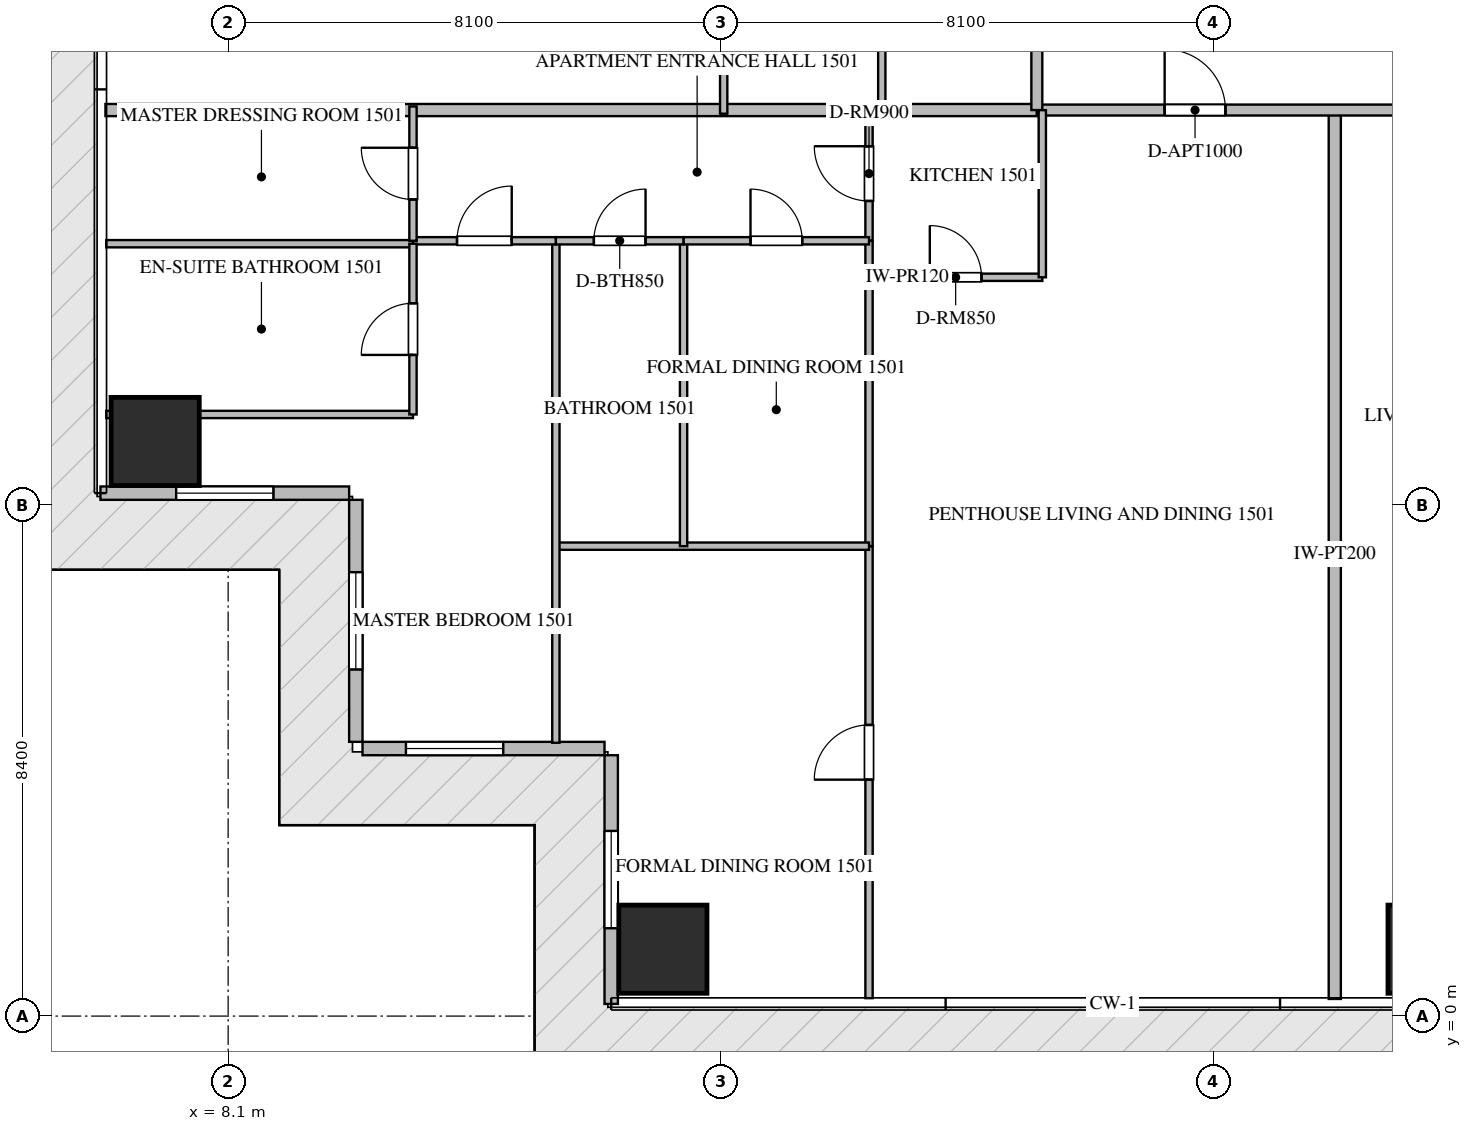
"""IFC4 building model, lengths in metres.
Left out: names, types, materials, properties, quantities, classifications, styles, units other than length and angle.
Written with IfcOpenShell. Run it as: python <this file> out.ifc"""

import sys

from ifc_helpers import new_model, si_unit, direction, frame, frame_2d, origin, origin_2d, place, context, subcontext, project, spatial, rectangle, extrude, source, transform, mapped, element, fill, save


model = new_model("IFC4")
c1 = context("Model", 3, precision=1e-05, world=origin(), true_north=direction((0.0, 1.0)))
c2 = subcontext(c1, "Body", "Model", "MODEL_VIEW")
j1 = project(units=[si_unit("LENGTHUNIT", "METRE"), si_unit("PLANEANGLEUNIT", "RADIAN")], contexts=[c1])
p1 = place(None, origin())
s1 = spatial("IfcSite", under=j1, at=p1, CompositionType="ELEMENT")
p2 = place(p1, origin())
s2 = spatial("IfcBuilding", under=s1, at=p2, CompositionType="ELEMENT")
p3 = place(p2, frame((0.0, 0.0, 64.2)))
s3 = spatial("IfcBuildingStorey", under=s2, at=p3, CompositionType="ELEMENT", Elevation=64.2)
m1 = source(origin(), c2, "Body", "SweptSolid", [
    extrude(rectangle(XDim=1.45, YDim=1.45, at=origin_2d()), origin(), (0.0, 0.0, 1.0), 3.75),
])
for number, where, z_axis, x_axis in (
    (1, (15.25, 1.1, -0.26), (0.0, 0.0, 1.0), (1.0, 0.0, 0.0)),
    (2, (27.9, 1.1, -0.26), (0.0, 0.0, 1.0), (1.0, 0.0, 0.0)),
    (3, (6.9, 9.45, -0.26), (0.0, 0.0, 1.0), (1.0, 0.0, 0.0)),
):
    element("IfcColumn", number, at=place(p3, frame(where, z_axis=z_axis, x_axis=x_axis)), inside=s3, PredefinedType="COLUMN", context=c2, shape_type="MappedRepresentation", body=[
        mapped(m1, transform((0.0, 0.0, 0.0), scale=1.0)),
    ])
p4 = place(p3, frame((6.0, 8.6, 0.0), z_axis=(0.0, 0.0, 1.0), x_axis=(1.0, 0.0, 0.0)))
e4 = element("IfcWall", 4, at=p4, inside=s3, PredefinedType="ELEMENTEDWALL", context=c2, shape_type="SweptSolid", body=[
    extrude(rectangle(XDim=4.09, YDim=0.22, at=frame_2d((2.045, 0.0))), origin(), (0.0, 0.0, 1.0), 3.475),
])
p5 = place(p4, frame((1.245, 0.0, 0.65)))
e5 = element("IfcOpeningElement", 5, at=p5, cuts=e4, PredefinedType="OPENING", context=c2, shape_type="SweptSolid", body=[
    extrude(rectangle(XDim=1.6, YDim=2.1, at=frame_2d((0.8, 1.05))), frame((0.0, 0.12, 0.0), z_axis=(0.0, -1.0, 0.0), x_axis=(1.0, 0.0, 0.0)), (0.0, 0.0, 1.0), 0.24),
])
p6 = place(p3, frame((10.2, 8.49, 0.0), z_axis=(0.0, 0.0, 1.0), x_axis=(0.0, -1.0, 0.0)))
e6 = element("IfcWall", 6, at=p6, inside=s3, PredefinedType="ELEMENTEDWALL", context=c2, shape_type="SweptSolid", body=[
    extrude(rectangle(XDim=3.98, YDim=0.22, at=frame_2d((1.99, 0.0))), origin(), (0.0, 0.0, 1.0), 3.475),
])
p7 = place(p6, frame((1.19, 0.0, 0.65)))
e7 = element("IfcOpeningElement", 7, at=p7, cuts=e6, PredefinedType="OPENING", context=c2, shape_type="SweptSolid", body=[
    extrude(rectangle(XDim=1.6, YDim=2.1, at=frame_2d((0.8, 1.05))), frame((0.0, 0.12, 0.0), z_axis=(0.0, -1.0, 0.0), x_axis=(1.0, 0.0, 0.0)), (0.0, 0.0, 1.0), 0.24),
])
p8 = place(p3, frame((10.31, 4.4, 0.0), z_axis=(0.0, 0.0, 1.0), x_axis=(1.0, 0.0, 0.0)))
e8 = element("IfcWall", 8, at=p8, inside=s3, PredefinedType="ELEMENTEDWALL", context=c2, shape_type="SweptSolid", body=[
    extrude(rectangle(XDim=3.98, YDim=0.22, at=frame_2d((1.99, 0.0))), origin(), (0.0, 0.0, 1.0), 3.475),
])
p9 = place(p8, frame((0.714, 0.0, 0.65)))
e9 = element("IfcOpeningElement", 9, at=p9, cuts=e8, PredefinedType="OPENING", context=c2, shape_type="SweptSolid", body=[
    extrude(rectangle(XDim=1.6, YDim=2.1, at=frame_2d((0.8, 1.05))), frame((0.0, 0.12, 0.0), z_axis=(0.0, -1.0, 0.0), x_axis=(1.0, 0.0, 0.0)), (0.0, 0.0, 1.0), 0.24),
])
p10 = place(p3, frame((14.4, 4.29, 0.0), z_axis=(0.0, 0.0, 1.0), x_axis=(0.0, -1.0, 0.0)))
e10 = element("IfcWall", 10, at=p10, inside=s3, PredefinedType="ELEMENTEDWALL", context=c2, shape_type="SweptSolid", body=[
    extrude(rectangle(XDim=4.09, YDim=0.22, at=frame_2d((2.045, 0.0))), origin(), (0.0, 0.0, 1.0), 3.475),
])
p11 = place(p10, frame((1.245, 0.0, 0.65)))
e11 = element("IfcOpeningElement", 11, at=p11, cuts=e10, PredefinedType="OPENING", context=c2, shape_type="SweptSolid", body=[
    extrude(rectangle(XDim=1.6, YDim=2.1, at=frame_2d((0.8, 1.05))), frame((0.0, 0.12, 0.0), z_axis=(0.0, -1.0, 0.0), x_axis=(1.0, 0.0, 0.0)), (0.0, 0.0, 1.0), 0.24),
])
p12 = place(p3, frame((26.3, 0.282, 0.0), z_axis=(0.0, 0.0, 1.0), x_axis=(0.0, 1.0, 0.0)))
e12 = element("IfcWall", 12, at=p12, inside=s3, PredefinedType="PARTITIONING", context=c2, shape_type="SweptSolid", body=[
    extrude(rectangle(XDim=14.618, YDim=0.2, at=frame_2d((7.309, 0.0))), origin(), (0.0, 0.0, 1.0), 3.49),
])
p13 = place(p3, frame((6.082, 14.9, 0.0), z_axis=(0.0, 0.0, 1.0), x_axis=(1.0, 0.0, 0.0)))
e13 = element("IfcWall", 13, at=p13, inside=s3, PredefinedType="PARTITIONING", context=c2, shape_type="SweptSolid", body=[
    extrude(rectangle(XDim=15.318, YDim=0.2, at=frame_2d((7.659, 0.0))), origin(), (0.0, 0.0, 1.0), 3.49),
])
p14 = place(p3, frame((21.402, 14.9, 0.0), z_axis=(0.0, 0.0, 1.0), x_axis=(1.0, 0.0, 0.0)))
e14 = element("IfcWall", 14, at=p14, inside=s3, PredefinedType="PARTITIONING", context=c2, shape_type="SweptSolid", body=[
    extrude(rectangle(XDim=21.996, YDim=0.18, at=frame_2d((10.998, 0.0))), origin(), (0.0, 0.0, 1.0), 3.49),
])
p15 = place(p14, frame((2.1, 0.0, 0.0)))
e15 = element("IfcOpeningElement", 15, at=p15, cuts=e14, PredefinedType="OPENING", context=c2, shape_type="SweptSolid", body=[
    extrude(rectangle(XDim=1.0, YDim=2.15, at=frame_2d((0.5, 1.075))), frame((0.0, 0.1, 0.0), z_axis=(0.0, -1.0, 0.0), x_axis=(1.0, 0.0, 0.0)), (0.0, 0.0, 1.0), 0.2),
])
p16 = place(p14, frame((6.719, 0.0, 0.0)))
e16 = element("IfcOpeningElement", 16, at=p16, cuts=e14, PredefinedType="OPENING", context=c2, shape_type="SweptSolid", body=[
    extrude(rectangle(XDim=1.0, YDim=2.15, at=frame_2d((0.5, 1.075))), frame((0.0, 0.1, 0.0), z_axis=(0.0, -1.0, 0.0), x_axis=(1.0, 0.0, 0.0)), (0.0, 0.0, 1.0), 0.2),
])
p17 = place(p14, frame((18.896, 0.0, 0.0)))
e17 = element("IfcOpeningElement", 17, at=p17, cuts=e14, PredefinedType="OPENING", context=c2, shape_type="SweptSolid", body=[
    extrude(rectangle(XDim=1.0, YDim=2.15, at=frame_2d((0.5, 1.075))), frame((0.0, 0.1, 0.0), z_axis=(0.0, -1.0, 0.0), x_axis=(1.0, 0.0, 0.0)), (0.0, 0.0, 1.0), 0.2),
])
p18 = place(p3, frame((21.4, 14.9, 0.0), z_axis=(0.0, 0.0, 1.0), x_axis=(0.0, 1.0, 0.0)))
e18 = element("IfcWall", 18, at=p18, inside=s3, PredefinedType="PARTITIONING", context=c2, shape_type="SweptSolid", body=[
    extrude(rectangle(XDim=20.6, YDim=0.18, at=frame_2d((10.3, 0.0))), origin(), (0.0, 0.0, 1.0), 3.49),
])
p19 = place(p18, frame((5.919, 0.0, 0.0)))
e19 = element("IfcOpeningElement", 19, at=p19, cuts=e18, PredefinedType="OPENING", context=c2, shape_type="SweptSolid", body=[
    extrude(rectangle(XDim=1.0, YDim=2.15, at=frame_2d((0.5, 1.075))), frame((0.0, 0.1, 0.0), z_axis=(0.0, -1.0, 0.0), x_axis=(1.0, 0.0, 0.0)), (0.0, 0.0, 1.0), 0.2),
])
p20 = place(p18, frame((17.64, 0.0, 0.0)))
e20 = element("IfcOpeningElement", 20, at=p20, cuts=e18, PredefinedType="OPENING", context=c2, shape_type="SweptSolid", body=[
    extrude(rectangle(XDim=1.0, YDim=2.15, at=frame_2d((0.5, 1.075))), frame((0.0, 0.1, 0.0), z_axis=(0.0, -1.0, 0.0), x_axis=(1.0, 0.0, 0.0)), (0.0, 0.0, 1.0), 0.2),
])
p21 = place(p3, frame((18.64, 12.15, 0.0), z_axis=(0.0, 0.0, 1.0), x_axis=(1.0, 0.0, 0.0)))
e21 = element("IfcWall", 21, at=p21, inside=s3, PredefinedType="PARTITIONING", context=c2, shape_type="SweptSolid", body=[
    extrude(rectangle(XDim=2.85, YDim=0.12, at=frame_2d((1.425, 0.0))), origin(), (0.0, 0.0, 1.0), 3.49),
])
p22 = place(p21, frame((1.0, 0.0, 0.0)))
e22 = element("IfcOpeningElement", 22, at=p22, cuts=e21, PredefinedType="OPENING", context=c2, shape_type="SweptSolid", body=[
    extrude(rectangle(XDim=0.85, YDim=2.1, at=frame_2d((0.425, 1.05))), frame((0.0, 0.07, 0.0), z_axis=(0.0, -1.0, 0.0), x_axis=(1.0, 0.0, 0.0)), (0.0, 0.0, 1.0), 0.14),
])
p23 = place(p3, frame((21.49, 12.15, 0.0), z_axis=(0.0, 0.0, 1.0), x_axis=(0.0, 1.0, 0.0)))
e23 = element("IfcWall", 23, at=p23, inside=s3, PredefinedType="PARTITIONING", context=c2, shape_type="SweptSolid", body=[
    extrude(rectangle(XDim=2.748, YDim=0.12, at=frame_2d((1.374, 0.0))), origin(), (0.0, 0.0, 1.0), 3.49),
])
p24 = place(p3, frame((18.64, 12.75, 0.0), z_axis=(0.0, 0.0, 1.0), x_axis=(0.0, 1.0, 0.0)))
e24 = element("IfcWall", 24, at=p24, inside=s3, PredefinedType="PARTITIONING", context=c2, shape_type="SweptSolid", body=[
    extrude(rectangle(XDim=2.21, YDim=0.12, at=frame_2d((1.105, 0.0))), origin(), (0.0, 0.0, 1.0), 3.49),
])
p25 = place(p24, frame((0.655, 0.0, 0.0)))
e25 = element("IfcOpeningElement", 25, at=p25, cuts=e24, PredefinedType="OPENING", context=c2, shape_type="SweptSolid", body=[
    extrude(rectangle(XDim=0.9, YDim=2.1, at=frame_2d((0.45, 1.05))), frame((0.0, 0.07, 0.0), z_axis=(0.0, -1.0, 0.0), x_axis=(1.0, 0.0, 0.0)), (0.0, 0.0, 1.0), 0.14),
])
p26 = place(p3, frame((18.64, 0.295, 0.0), z_axis=(0.0, 0.0, 1.0), x_axis=(0.0, 1.0, 0.0)))
e26 = element("IfcWall", 26, at=p26, inside=s3, PredefinedType="PARTITIONING", context=c2, shape_type="SweptSolid", body=[
    extrude(rectangle(XDim=7.433, YDim=0.12, at=frame_2d((3.717, 0.0))), origin(), (0.0, 0.0, 1.0), 3.49),
])
p27 = place(p26, frame((3.593, 0.0, 0.0)))
e27 = element("IfcOpeningElement", 27, at=p27, cuts=e26, PredefinedType="OPENING", context=c2, shape_type="SweptSolid", body=[
    extrude(rectangle(XDim=0.9, YDim=2.1, at=frame_2d((0.45, 1.05))), frame((0.0, 0.07, 0.0), z_axis=(0.0, -1.0, 0.0), x_axis=(1.0, 0.0, 0.0)), (0.0, 0.0, 1.0), 0.14),
])
p28 = place(p3, frame((18.64, 7.73, 0.0), z_axis=(0.0, 0.0, 1.0), x_axis=(0.0, 1.0, 0.0)))
e28 = element("IfcWall", 28, at=p28, inside=s3, PredefinedType="PARTITIONING", context=c2, shape_type="SweptSolid", body=[
    extrude(rectangle(XDim=5.018, YDim=0.12, at=frame_2d((2.509, 0.0))), origin(), (0.0, 0.0, 1.0), 3.49),
])
p29 = place(p3, frame((13.49, 7.728, 0.0), z_axis=(0.0, 0.0, 1.0), x_axis=(1.0, 0.0, 0.0)))
e29 = element("IfcWall", 29, at=p29, inside=s3, PredefinedType="PARTITIONING", context=c2, shape_type="SweptSolid", body=[
    extrude(rectangle(XDim=5.15, YDim=0.12, at=frame_2d((2.575, 0.0))), origin(), (0.0, 0.0, 1.0), 3.49),
])
p30 = place(p3, frame((13.49, 4.495, 0.0), z_axis=(0.0, 0.0, 1.0), x_axis=(0.0, 1.0, 0.0)))
e30 = element("IfcWall", 30, at=p30, inside=s3, PredefinedType="PARTITIONING", context=c2, shape_type="SweptSolid", body=[
    extrude(rectangle(XDim=8.255, YDim=0.12, at=frame_2d((4.127, 0.0))), origin(), (0.0, 0.0, 1.0), 3.49),
])
p31 = place(p3, frame((15.59, 7.728, 0.0), z_axis=(0.0, 0.0, 1.0), x_axis=(0.0, 1.0, 0.0)))
e31 = element("IfcWall", 31, at=p31, inside=s3, PredefinedType="PARTITIONING", context=c2, shape_type="SweptSolid", body=[
    extrude(rectangle(XDim=5.022, YDim=0.12, at=frame_2d((2.511, 0.0))), origin(), (0.0, 0.0, 1.0), 3.49),
])
p32 = place(p3, frame((13.49, 12.75, 0.0), z_axis=(0.0, 0.0, 1.0), x_axis=(1.0, 0.0, 0.0)))
e32 = element("IfcWall", 32, at=p32, inside=s3, PredefinedType="PARTITIONING", context=c2, shape_type="SweptSolid", body=[
    extrude(rectangle(XDim=2.1, YDim=0.12, at=frame_2d((1.05, 0.0))), origin(), (0.0, 0.0, 1.0), 3.49),
])
p33 = place(p32, frame((0.625, 0.0, 0.0)))
e33 = element("IfcOpeningElement", 33, at=p33, cuts=e32, PredefinedType="OPENING", context=c2, shape_type="SweptSolid", body=[
    extrude(rectangle(XDim=0.85, YDim=2.1, at=frame_2d((0.425, 1.05))), frame((0.0, 0.07, 0.0), z_axis=(0.0, -1.0, 0.0), x_axis=(1.0, 0.0, 0.0)), (0.0, 0.0, 1.0), 0.14),
])
p34 = place(p3, frame((15.592, 12.75, 0.0), z_axis=(0.0, 0.0, 1.0), x_axis=(1.0, 0.0, 0.0)))
e34 = element("IfcWall", 34, at=p34, inside=s3, PredefinedType="PARTITIONING", context=c2, shape_type="SweptSolid", body=[
    extrude(rectangle(XDim=3.048, YDim=0.12, at=frame_2d((1.524, 0.0))), origin(), (0.0, 0.0, 1.0), 3.49),
])
p35 = place(p34, frame((1.099, 0.0, 0.0)))
e35 = element("IfcOpeningElement", 35, at=p35, cuts=e34, PredefinedType="OPENING", context=c2, shape_type="SweptSolid", body=[
    extrude(rectangle(XDim=0.85, YDim=2.1, at=frame_2d((0.425, 1.05))), frame((0.0, 0.07, 0.0), z_axis=(0.0, -1.0, 0.0), x_axis=(1.0, 0.0, 0.0)), (0.0, 0.0, 1.0), 0.14),
])
p36 = place(p3, frame((11.14, 12.75, 0.0), z_axis=(0.0, 0.0, 1.0), x_axis=(1.0, 0.0, 0.0)))
e36 = element("IfcWall", 36, at=p36, inside=s3, PredefinedType="PARTITIONING", context=c2, shape_type="SweptSolid", body=[
    extrude(rectangle(XDim=2.348, YDim=0.12, at=frame_2d((1.174, 0.0))), origin(), (0.0, 0.0, 1.0), 3.49),
])
p37 = place(p36, frame((0.724, 0.0, 0.0)))
e37 = element("IfcOpeningElement", 37, at=p37, cuts=e36, PredefinedType="OPENING", context=c2, shape_type="SweptSolid", body=[
    extrude(rectangle(XDim=0.9, YDim=2.1, at=frame_2d((0.45, 1.05))), frame((0.0, 0.07, 0.0), z_axis=(0.0, -1.0, 0.0), x_axis=(1.0, 0.0, 0.0)), (0.0, 0.0, 1.0), 0.14),
])
p38 = place(p3, frame((6.095, 9.894, 0.0), z_axis=(0.0, 0.0, 1.0), x_axis=(1.0, 0.0, 0.0)))
e38 = element("IfcWall", 38, at=p38, inside=s3, PredefinedType="PARTITIONING", context=c2, shape_type="SweptSolid", body=[
    extrude(rectangle(XDim=5.045, YDim=0.12, at=frame_2d((2.522, 0.0))), origin(), (0.0, 0.0, 1.0), 3.49),
])
p39 = place(p3, frame((6.095, 12.702, 0.0), z_axis=(0.0, 0.0, 1.0), x_axis=(1.0, 0.0, 0.0)))
e39 = element("IfcWall", 39, at=p39, inside=s3, PredefinedType="PARTITIONING", context=c2, shape_type="SweptSolid", body=[
    extrude(rectangle(XDim=5.043, YDim=0.12, at=frame_2d((2.521, 0.0))), origin(), (0.0, 0.0, 1.0), 3.49),
])
p40 = place(p3, frame((11.14, 9.894, 0.0), z_axis=(0.0, 0.0, 1.0), x_axis=(0.0, 1.0, 0.0)))
e40 = element("IfcWall", 40, at=p40, inside=s3, PredefinedType="PARTITIONING", context=c2, shape_type="SweptSolid", body=[
    extrude(rectangle(XDim=2.808, YDim=0.12, at=frame_2d((1.404, 0.0))), origin(), (0.0, 0.0, 1.0), 3.49),
])
p41 = place(p40, frame((0.979, 0.0, 0.0)))
e41 = element("IfcOpeningElement", 41, at=p41, cuts=e40, PredefinedType="OPENING", context=c2, shape_type="SweptSolid", body=[
    extrude(rectangle(XDim=0.85, YDim=2.1, at=frame_2d((0.425, 1.05))), frame((0.0, 0.07, 0.0), z_axis=(0.0, -1.0, 0.0), x_axis=(1.0, 0.0, 0.0)), (0.0, 0.0, 1.0), 0.14),
])
p42 = place(p3, frame((11.14, 12.75, 0.0), z_axis=(0.0, 0.0, 1.0), x_axis=(0.0, 1.0, 0.0)))
e42 = element("IfcWall", 42, at=p42, inside=s3, PredefinedType="PARTITIONING", context=c2, shape_type="SweptSolid", body=[
    extrude(rectangle(XDim=2.21, YDim=0.12, at=frame_2d((1.105, 0.0))), origin(), (0.0, 0.0, 1.0), 3.49),
])
p43 = place(p42, frame((0.68, 0.0, 0.0)))
e43 = element("IfcOpeningElement", 43, at=p43, cuts=e42, PredefinedType="OPENING", context=c2, shape_type="SweptSolid", body=[
    extrude(rectangle(XDim=0.85, YDim=2.1, at=frame_2d((0.425, 1.05))), frame((0.0, 0.07, 0.0), z_axis=(0.0, -1.0, 0.0), x_axis=(1.0, 0.0, 0.0)), (0.0, 0.0, 1.0), 0.14),
])
for number, where, z_axis, x_axis in (
    (44, (18.85, 14.84, 0.0), (0.0, 0.0, 1.0), (0.0, 1.0, 0.0)),
    (45, (16.25, 14.84, 0.0), (0.0, 0.0, 1.0), (0.0, 1.0, 0.0)),
):
    element("IfcWall", number, at=place(p3, frame(where, z_axis=z_axis, x_axis=x_axis)), inside=s3, PredefinedType="PARTITIONING", context=c2, shape_type="SweptSolid", body=[
        extrude(rectangle(XDim=2.81, YDim=0.12, at=frame_2d((1.405, 0.0))), origin(), (0.0, 0.0, 1.0), 3.49),
    ])
m2 = source(origin(), c2, "Body", "SweptSolid", [
    extrude(rectangle(XDim=1.6, YDim=2.1, at=frame_2d((0.8, 1.05))), frame((0.0, 0.03, 0.0), z_axis=(0.0, -1.0, 0.0), x_axis=(1.0, 0.0, 0.0)), (0.0, 0.0, 1.0), 0.06),
])
p44 = place(p5, origin())
e46 = element("IfcWindow", 46, at=p44, inside=s3, PartitioningType="SINGLE_PANEL", PredefinedType="WINDOW", context=c2, shape_type="MappedRepresentation", body=[
    mapped(m2, transform((0.0, 0.0, 0.0), scale=1.0)),
])
fill(e5, e46)
p45 = place(p7, origin())
e47 = element("IfcWindow", 47, at=p45, inside=s3, PartitioningType="SINGLE_PANEL", PredefinedType="WINDOW", context=c2, shape_type="MappedRepresentation", body=[
    mapped(m2, transform((0.0, 0.0, 0.0), scale=1.0)),
])
fill(e7, e47)
p46 = place(p9, origin())
e48 = element("IfcWindow", 48, at=p46, inside=s3, PartitioningType="SINGLE_PANEL", PredefinedType="WINDOW", context=c2, shape_type="MappedRepresentation", body=[
    mapped(m2, transform((0.0, 0.0, 0.0), scale=1.0)),
])
fill(e9, e48)
p47 = place(p11, origin())
e49 = element("IfcWindow", 49, at=p47, inside=s3, PartitioningType="SINGLE_PANEL", PredefinedType="WINDOW", context=c2, shape_type="MappedRepresentation", body=[
    mapped(m2, transform((0.0, 0.0, 0.0), scale=1.0)),
])
fill(e11, e49)
m3 = source(origin(), c2, "Body", "SweptSolid", [
    extrude(rectangle(XDim=1.0, YDim=2.15, at=frame_2d((0.5, 1.075))), frame((0.0, 0.025, 0.0), z_axis=(0.0, -1.0, 0.0), x_axis=(1.0, 0.0, 0.0)), (0.0, 0.0, 1.0), 0.05),
])
p48 = place(p15, origin())
e50 = element("IfcDoor", 50, at=p48, inside=s3, OperationType="SINGLE_SWING_LEFT", PredefinedType="DOOR", context=c2, shape_type="MappedRepresentation", body=[
    mapped(m3, transform((0.0, 0.0, 0.0), scale=1.0)),
])
fill(e15, e50)
m4 = source(origin(), c2, "Body", "SweptSolid", [
    extrude(rectangle(XDim=0.85, YDim=2.1, at=frame_2d((0.425, 1.05))), frame((0.0, 0.025, 0.0), z_axis=(0.0, -1.0, 0.0), x_axis=(1.0, 0.0, 0.0)), (0.0, 0.0, 1.0), 0.05),
])
p49 = place(p22, origin())
e51 = element("IfcDoor", 51, at=p49, inside=s3, OperationType="SINGLE_SWING_LEFT", PredefinedType="DOOR", context=c2, shape_type="MappedRepresentation", body=[
    mapped(m4, transform((0.0, 0.0, 0.0), scale=1.0)),
])
fill(e22, e51)
m5 = source(origin(), c2, "Body", "SweptSolid", [
    extrude(rectangle(XDim=0.9, YDim=2.1, at=frame_2d((0.45, 1.05))), frame((0.0, 0.025, 0.0), z_axis=(0.0, -1.0, 0.0), x_axis=(1.0, 0.0, 0.0)), (0.0, 0.0, 1.0), 0.05),
])
p50 = place(p25, origin())
e52 = element("IfcDoor", 52, at=p50, inside=s3, OperationType="SINGLE_SWING_RIGHT", PredefinedType="DOOR", context=c2, shape_type="MappedRepresentation", body=[
    mapped(m5, transform((0.0, 0.0, 0.0), scale=1.0)),
])
fill(e25, e52)
p51 = place(p27, origin())
e53 = element("IfcDoor", 53, at=p51, inside=s3, OperationType="SINGLE_SWING_LEFT", PredefinedType="DOOR", context=c2, shape_type="MappedRepresentation", body=[
    mapped(m5, transform((0.0, 0.0, 0.0), scale=1.0)),
])
fill(e27, e53)
p52 = place(p33, origin())
e54 = element("IfcDoor", 54, at=p52, inside=s3, OperationType="SINGLE_SWING_RIGHT", PredefinedType="DOOR", context=c2, shape_type="MappedRepresentation", body=[
    mapped(m4, transform((0.0, 0.0, 0.0), scale=1.0)),
])
fill(e33, e54)
p53 = place(p35, origin())
e55 = element("IfcDoor", 55, at=p53, inside=s3, OperationType="SINGLE_SWING_LEFT", PredefinedType="DOOR", context=c2, shape_type="MappedRepresentation", body=[
    mapped(m4, transform((0.0, 0.0, 0.0), scale=1.0)),
])
fill(e35, e55)
p54 = place(p37, origin())
e56 = element("IfcDoor", 56, at=p54, inside=s3, OperationType="SINGLE_SWING_RIGHT", PredefinedType="DOOR", context=c2, shape_type="MappedRepresentation", body=[
    mapped(m5, transform((0.0, 0.0, 0.0), scale=1.0)),
])
fill(e37, e56)
p55 = place(p41, origin())
e57 = element("IfcDoor", 57, at=p55, inside=s3, OperationType="SINGLE_SWING_LEFT", PredefinedType="DOOR", context=c2, shape_type="MappedRepresentation", body=[
    mapped(m4, transform((0.0, 0.0, 0.0), scale=1.0)),
])
fill(e41, e57)
p56 = place(p43, origin())
e58 = element("IfcDoor", 58, at=p56, inside=s3, OperationType="SINGLE_SWING_RIGHT", PredefinedType="DOOR", context=c2, shape_type="MappedRepresentation", body=[
    mapped(m4, transform((0.0, 0.0, 0.0), scale=1.0)),
])
fill(e43, e58)
save(model, sys.argv[1])
